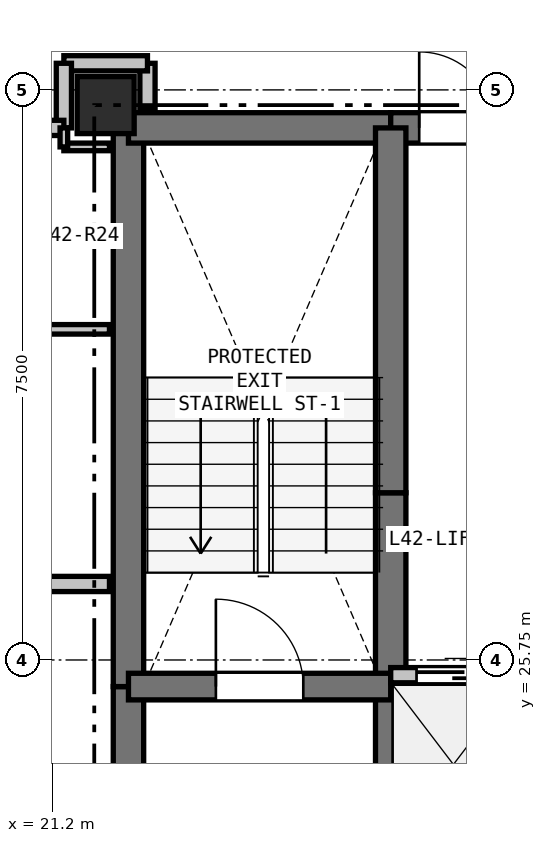
"""IFC4 building model, lengths in metres.
Left out: names, types, materials, properties, quantities, classifications, styles, units other than length and angle.
Written with IfcOpenShell. Run it as: python <this file> out.ifc"""

import sys

from ifc_helpers import new_model, si_unit, direction, frame, frame_2d, origin, origin_2d, place, context, subcontext, project, spatial, rectangle, extrude, element, fill, save


model = new_model("IFC4")
c1 = context("Model", 3, precision=1e-05, world=origin(), true_north=direction((0.0, 1.0)))
c2 = subcontext(c1, "Body", "Model", "MODEL_VIEW")
j1 = project(units=[si_unit("LENGTHUNIT", "METRE"), si_unit("PLANEANGLEUNIT", "RADIAN")], contexts=[c1])
p1 = place(None, origin())
s1 = spatial("IfcSite", under=j1, at=p1, CompositionType="ELEMENT")
p2 = place(p1, origin())
s2 = spatial("IfcBuilding", under=s1, at=p2, CompositionType="ELEMENT")
p3 = place(p2, frame((0.0, 0.0, 150.9)))
s3 = spatial("IfcBuildingStorey", under=s2, at=p3, CompositionType="ELEMENT", Elevation=150.9)
p4 = place(p3, frame((21.9, 33.05, 0.0), z_axis=(0.0, 0.0, 1.0), x_axis=(1.0, 0.0, 0.0)))
e1 = element("IfcColumn", 1, at=p4, inside=s3, PredefinedType="COLUMN", context=c2, shape_type="SweptSolid", body=[
    extrude(rectangle(XDim=0.75, YDim=0.75, at=origin_2d()), origin(), (0.0, 0.0, 1.0), 3.3),
])
p5 = place(p3, frame((22.2, 20.75, 0.0), z_axis=(0.0, 0.0, 1.0), x_axis=(0.0, 1.0, 0.0)))
e2 = element("IfcWall", 2, at=p5, inside=s3, PredefinedType="SHEAR", context=c2, shape_type="SweptSolid", body=[
    extrude(rectangle(XDim=4.65, YDim=0.4, at=frame_2d((2.325, 0.0))), origin(), (0.0, 0.0, 1.0), 3.06),
])
p6 = place(p3, frame((22.2, 25.4, 0.0), z_axis=(0.0, 0.0, 1.0), x_axis=(0.0, 1.0, 0.0)))
e3 = element("IfcWall", 3, at=p6, inside=s3, PredefinedType="SHEAR", context=c2, shape_type="SweptSolid", body=[
    extrude(rectangle(XDim=7.35, YDim=0.4, at=frame_2d((3.675, 0.0))), origin(), (0.0, 0.0, 1.0), 3.06),
])
p7 = place(p3, frame((22.2, 32.75, 0.0), z_axis=(0.0, 0.0, 1.0), x_axis=(1.0, 0.0, 0.0)))
e4 = element("IfcWall", 4, at=p7, inside=s3, PredefinedType="SHEAR", context=c2, shape_type="SweptSolid", body=[
    extrude(rectangle(XDim=3.45, YDim=0.4, at=frame_2d((1.725, 0.0))), origin(), (0.0, 0.0, 1.0), 3.06),
])
p8 = place(p3, frame((25.65, 32.75, 0.0), z_axis=(0.0, 0.0, 1.0), x_axis=(1.0, 0.0, 0.0)))
e5 = element("IfcWall", 5, at=p8, inside=s3, PredefinedType="SHEAR", context=c2, shape_type="SweptSolid", body=[
    extrude(rectangle(XDim=1.75, YDim=0.4, at=frame_2d((0.875, 0.0))), origin(), (0.0, 0.0, 1.0), 3.06),
])
p9 = place(p8, frame((0.375, 0.0, 0.0)))
e6 = element("IfcOpeningElement", 6, at=p9, cuts=e5, PredefinedType="OPENING", context=c2, shape_type="SweptSolid", body=[
    extrude(rectangle(XDim=1.0, YDim=2.15, at=frame_2d((0.5, 1.075))), frame((0.0, 0.21, 0.0), z_axis=(0.0, -1.0, 0.0), x_axis=(1.0, 0.0, 0.0)), (0.0, 0.0, 1.0), 0.42),
])
p10 = place(p3, frame((25.65, 22.75, 0.0), z_axis=(0.0, 0.0, 1.0), x_axis=(0.0, 1.0, 0.0)))
e7 = element("IfcWall", 7, at=p10, inside=s3, PredefinedType="SHEAR", context=c2, shape_type="SweptSolid", body=[
    extrude(rectangle(XDim=2.8, YDim=0.4, at=frame_2d((1.4, 0.0))), origin(), (0.0, 0.0, 1.0), 3.06),
])
p11 = place(p3, frame((25.65, 25.55, 0.0), z_axis=(0.0, 0.0, 1.0), x_axis=(0.0, 1.0, 0.0)))
e8 = element("IfcWall", 8, at=p11, inside=s3, PredefinedType="SHEAR", context=c2, shape_type="SweptSolid", body=[
    extrude(rectangle(XDim=2.4, YDim=0.4, at=frame_2d((1.2, 0.0))), origin(), (0.0, 0.0, 1.0), 3.06),
])
p12 = place(p3, frame((25.65, 27.95, 0.0), z_axis=(0.0, 0.0, 1.0), x_axis=(0.0, 1.0, 0.0)))
e9 = element("IfcWall", 9, at=p12, inside=s3, PredefinedType="SHEAR", context=c2, shape_type="SweptSolid", body=[
    extrude(rectangle(XDim=4.8, YDim=0.4, at=frame_2d((2.4, 0.0))), origin(), (0.0, 0.0, 1.0), 3.06),
])
p13 = place(p3, frame((22.2, 25.4, 0.0), z_axis=(0.0, 0.0, 1.0), x_axis=(1.0, 0.0, 0.0)))
e10 = element("IfcWall", 10, at=p13, inside=s3, PredefinedType="SHEAR", context=c2, shape_type="SweptSolid", body=[
    extrude(rectangle(XDim=3.45, YDim=0.35, at=frame_2d((1.725, 0.0))), origin(), (0.0, 0.0, 1.0), 3.06),
])
p14 = place(p13, frame((1.15, 0.0, 0.0)))
e11 = element("IfcOpeningElement", 11, at=p14, cuts=e10, PredefinedType="OPENING", context=c2, shape_type="SweptSolid", body=[
    extrude(rectangle(XDim=1.15, YDim=2.15, at=frame_2d((0.575, 1.075))), frame((0.0, 0.185, 0.0), z_axis=(0.0, -1.0, 0.0), x_axis=(1.0, 0.0, 0.0)), (0.0, 0.0, 1.0), 0.37),
])
p15 = place(p3, frame((25.65, 25.55, 0.0), z_axis=(0.0, 0.0, 1.0), x_axis=(1.0, 0.0, 0.0)))
e12 = element("IfcWall", 12, at=p15, inside=s3, PredefinedType="PARTITIONING", context=c2, shape_type="SweptSolid", body=[
    extrude(rectangle(XDim=4.95, YDim=0.2, at=frame_2d((2.475, 0.0))), origin(), (0.0, 0.0, 1.0), 3.06),
])
p16 = place(p15, frame((0.34, 0.0, 0.0)))
e13 = element("IfcOpeningElement", 13, at=p16, cuts=e12, PredefinedType="OPENING", context=c2, shape_type="SweptSolid", body=[
    extrude(rectangle(XDim=1.1, YDim=2.15, at=frame_2d((0.55, 1.075))), frame((0.0, 0.11, 0.0), z_axis=(0.0, -1.0, 0.0), x_axis=(1.0, 0.0, 0.0)), (0.0, 0.0, 1.0), 0.22),
])
p17 = place(p15, frame((1.99, 0.0, 0.0)))
e14 = element("IfcOpeningElement", 14, at=p17, cuts=e12, PredefinedType="OPENING", context=c2, shape_type="SweptSolid", body=[
    extrude(rectangle(XDim=1.1, YDim=2.15, at=frame_2d((0.55, 1.075))), frame((0.0, 0.11, 0.0), z_axis=(0.0, -1.0, 0.0), x_axis=(1.0, 0.0, 0.0)), (0.0, 0.0, 1.0), 0.22),
])
p18 = place(p15, frame((3.64, 0.0, 0.0)))
e15 = element("IfcOpeningElement", 15, at=p18, cuts=e12, PredefinedType="OPENING", context=c2, shape_type="SweptSolid", body=[
    extrude(rectangle(XDim=1.1, YDim=2.15, at=frame_2d((0.55, 1.075))), frame((0.0, 0.11, 0.0), z_axis=(0.0, -1.0, 0.0), x_axis=(1.0, 0.0, 0.0)), (0.0, 0.0, 1.0), 0.22),
])
p19 = place(p3, frame((22.45, 33.0, 0.0), z_axis=(0.0, 0.0, 1.0), x_axis=(0.0, 1.0, 0.0)))
e16 = element("IfcWall", 16, at=p19, inside=s3, PredefinedType="PARTITIONING", context=c2, shape_type="SweptSolid", body=[
    extrude(rectangle(XDim=0.6, YDim=0.2, at=frame_2d((0.3, 0.0))), origin(), (0.0, 0.0, 1.0), 2.585),
])
p20 = place(p3, frame((22.45, 33.6, 0.0), z_axis=(0.0, 0.0, 1.0), x_axis=(-1.0, 0.0, 0.0)))
e17 = element("IfcWall", 17, at=p20, inside=s3, PredefinedType="PARTITIONING", context=c2, shape_type="SweptSolid", body=[
    extrude(rectangle(XDim=1.1, YDim=0.2, at=frame_2d((0.55, 0.0))), origin(), (0.0, 0.0, 1.0), 3.06),
])
p21 = place(p3, frame((21.35, 33.6, 0.0), z_axis=(0.0, 0.0, 1.0), x_axis=(0.0, -1.0, 0.0)))
e18 = element("IfcWall", 18, at=p21, inside=s3, PredefinedType="PARTITIONING", context=c2, shape_type="SweptSolid", body=[
    extrude(rectangle(XDim=0.85, YDim=0.2, at=frame_2d((0.425, 0.0))), origin(), (0.0, 0.0, 1.0), 2.433),
])
p22 = place(p3, frame((21.35, 32.75, 0.0), z_axis=(0.0, 0.0, 1.0), x_axis=(-1.0, 0.0, 0.0)))
e19 = element("IfcWall", 19, at=p22, inside=s3, PredefinedType="PARTITIONING", context=c2, shape_type="SweptSolid", body=[
    extrude(rectangle(XDim=1.35, YDim=0.2, at=frame_2d((0.675, 0.0))), origin(), (0.0, 0.0, 1.0), 2.433),
])
p23 = place(p22, frame((0.175, 0.0, 0.0)))
e20 = element("IfcOpeningElement", 20, at=p23, cuts=e19, PredefinedType="OPENING", context=c2, shape_type="SweptSolid", body=[
    extrude(rectangle(XDim=1.0, YDim=2.15, at=frame_2d((0.5, 1.075))), frame((0.0, 0.11, 0.0), z_axis=(0.0, -1.0, 0.0), x_axis=(1.0, 0.0, 0.0)), (0.0, 0.0, 1.0), 0.22),
])
p24 = place(p3, frame((21.35, 32.5, 0.0), z_axis=(0.0, 0.0, 1.0), x_axis=(1.0, 0.0, 0.0)))
e21 = element("IfcWall", 21, at=p24, inside=s3, PredefinedType="PARTITIONING", context=c2, shape_type="SweptSolid", body=[
    extrude(rectangle(XDim=0.6, YDim=0.1, at=frame_2d((0.3, 0.0))), origin(), (0.0, 0.0, 1.0), 2.585),
])
p25 = place(p3, frame((21.95, 30.1, 0.0), z_axis=(0.0, 0.0, 1.0), x_axis=(-1.0, 0.0, 0.0)))
e22 = element("IfcWall", 22, at=p25, inside=s3, PredefinedType="PARTITIONING", context=c2, shape_type="SweptSolid", body=[
    extrude(rectangle(XDim=2.75, YDim=0.125, at=frame_2d((1.375, 0.0))), origin(), (0.0, 0.0, 1.0), 2.585),
])
p26 = place(p25, frame((0.9, 0.0, 0.0)))
e23 = element("IfcOpeningElement", 23, at=p26, cuts=e22, PredefinedType="OPENING", context=c2, shape_type="SweptSolid", body=[
    extrude(rectangle(XDim=0.95, YDim=2.1, at=frame_2d((0.475, 1.05))), frame((0.0, 0.073, 0.0), z_axis=(0.0, -1.0, 0.0), x_axis=(1.0, 0.0, 0.0)), (0.0, 0.0, 1.0), 0.145),
])
p27 = place(p3, frame((21.35, 32.75, 0.0), z_axis=(0.0, 0.0, 1.0), x_axis=(0.0, -1.0, 0.0)))
e24 = element("IfcWall", 24, at=p27, inside=s3, PredefinedType="PARTITIONING", context=c2, shape_type="SweptSolid", body=[
    extrude(rectangle(XDim=0.25, YDim=0.1, at=frame_2d((0.125, 0.0))), origin(), (0.0, 0.0, 1.0), 3.06),
])
p28 = place(p3, frame((6.709, 26.75, 0.0), z_axis=(0.0, 0.0, 1.0), x_axis=(1.0, 0.0, 0.0)))
e25 = element("IfcWall", 25, at=p28, inside=s3, PredefinedType="PARTITIONING", context=c2, shape_type="SweptSolid", body=[
    extrude(rectangle(XDim=15.241, YDim=0.2, at=frame_2d((7.62, 0.0))), origin(), (0.0, 0.0, 1.0), 2.585),
])
p29 = place(p16, origin())
e26 = element("IfcDoor", 26, at=p29, inside=s3, OperationType="SLIDING_TO_LEFT", PredefinedType="DOOR", context=c2, shape_type="SweptSolid", body=[
    extrude(rectangle(XDim=1.1, YDim=2.15, at=frame_2d((0.55, 1.075))), frame((0.0, 0.025, 0.0), z_axis=(0.0, -1.0, 0.0), x_axis=(1.0, 0.0, 0.0)), (0.0, 0.0, 1.0), 0.05),
])
fill(e13, e26)
p30 = place(p9, origin())
e27 = element("IfcDoor", 27, at=p30, inside=s3, OperationType="SINGLE_SWING_LEFT", PredefinedType="DOOR", context=c2, shape_type="SweptSolid", body=[
    extrude(rectangle(XDim=1.0, YDim=2.15, at=frame_2d((0.5, 1.075))), frame((0.0, 0.025, 0.0), z_axis=(0.0, -1.0, 0.0), x_axis=(1.0, 0.0, 0.0)), (0.0, 0.0, 1.0), 0.05),
])
fill(e6, e27)
p31 = place(p14, origin())
e28 = element("IfcDoor", 28, at=p31, inside=s3, OperationType="SINGLE_SWING_LEFT", PredefinedType="DOOR", context=c2, shape_type="SweptSolid", body=[
    extrude(rectangle(XDim=1.15, YDim=2.15, at=frame_2d((0.575, 1.075))), frame((0.0, 0.025, 0.0), z_axis=(0.0, -1.0, 0.0), x_axis=(1.0, 0.0, 0.0)), (0.0, 0.0, 1.0), 0.05),
])
fill(e11, e28)
save(model, sys.argv[1])
